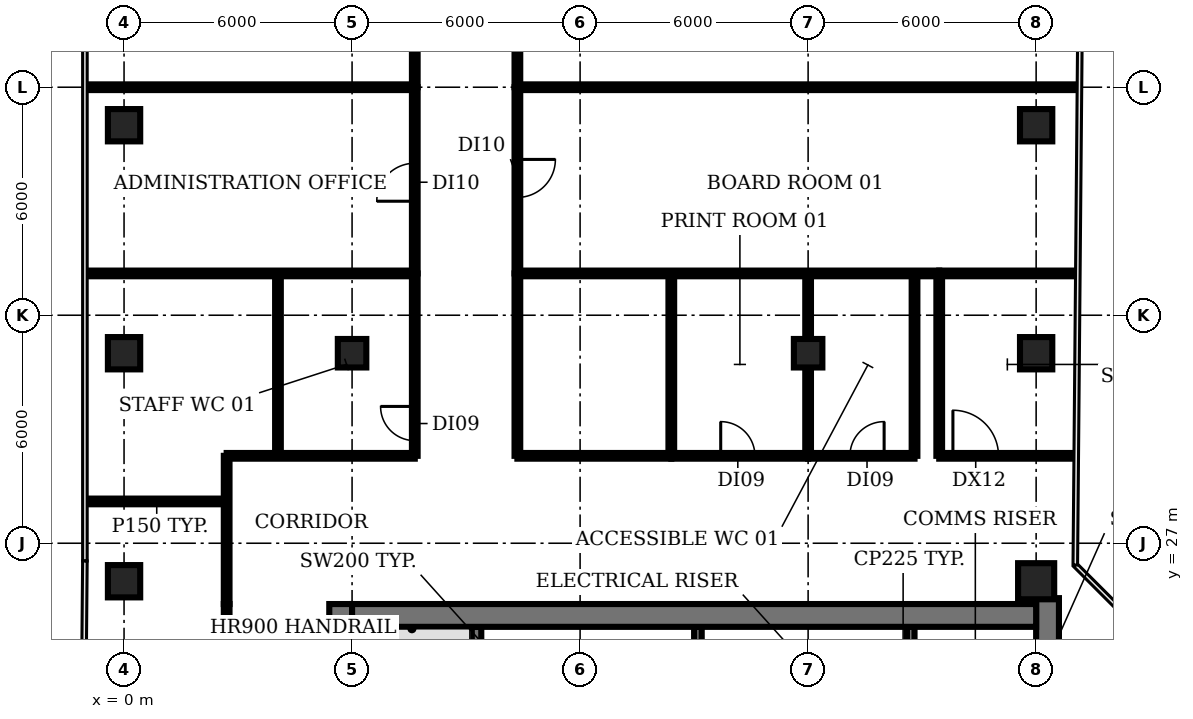
"""IFC4 building model, lengths in metres.
Left out: names, types, materials, properties, quantities, classifications, styles, units other than length and angle.
Written with IfcOpenShell. Run it as: python <this file> out.ifc"""

import sys

from ifc_helpers import new_model, si_unit, direction, frame, frame_2d, origin, origin_2d, place, context, subcontext, project, spatial, rectangle, circle, extrude, element, fill, save


model = new_model("IFC4")
c1 = context("Model", 3, precision=1e-05, world=origin(), true_north=direction((0.0, 1.0)))
c2 = subcontext(c1, "Body", "Model", "MODEL_VIEW")
j1 = project(units=[si_unit("LENGTHUNIT", "METRE"), si_unit("PLANEANGLEUNIT", "RADIAN")], contexts=[c1])
p1 = place(None, origin())
s1 = spatial("IfcSite", under=j1, at=p1, CompositionType="ELEMENT")
p2 = place(p1, origin())
s2 = spatial("IfcBuilding", under=s1, at=p2, CompositionType="ELEMENT")
p3 = place(p2, frame((0.0, 0.0, 167.6)))
s3 = spatial("IfcBuildingStorey", under=s2, at=p3, CompositionType="ELEMENT", Elevation=167.6)
for number, where, z_axis, x_axis in (
    (1, (0.0, 26.0, 0.0), (0.0, 0.0, 1.0), (1.0, 0.0, 0.0)),
    (2, (0.0, 32.0, 0.0), (0.0, 0.0, 1.0), (1.0, 0.0, 0.0)),
    (3, (0.0, 38.0, 0.0), (0.0, 0.0, 1.0), (1.0, 0.0, 0.0)),
):
    element("IfcColumn", number, at=place(p3, frame(where, z_axis=z_axis, x_axis=x_axis)), inside=s3, PredefinedType="COLUMN", context=c2, shape_type="SweptSolid", body=[
        extrude(rectangle(XDim=0.85, YDim=0.85, at=origin_2d()), origin(), (0.0, 0.0, 1.0), 3.85),
    ])
for number, where, z_axis, x_axis in (
    (4, (6.0, 32.0, 0.0), (0.0, 0.0, 1.0), (1.0, 0.0, 0.0)),
    (5, (18.0, 32.0, 0.0), (0.0, 0.0, 1.0), (1.0, 0.0, 0.0)),
):
    element("IfcColumn", number, at=place(p3, frame(where, z_axis=z_axis, x_axis=x_axis)), inside=s3, PredefinedType="COLUMN", context=c2, shape_type="SweptSolid", body=[
        extrude(rectangle(XDim=0.75, YDim=0.75, at=origin_2d()), origin(), (0.0, 0.0, 1.0), 3.85),
    ])
p4 = place(p3, frame((24.0, 26.0, 0.0), z_axis=(0.0, 0.0, 1.0), x_axis=(1.0, 0.0, 0.0)))
e6 = element("IfcColumn", 6, at=p4, inside=s3, PredefinedType="COLUMN", context=c2, shape_type="SweptSolid", body=[
    extrude(circle(Radius=0.475, at=origin_2d()), origin(), (0.0, 0.0, 1.0), 3.85),
])
for number, where, z_axis, x_axis in (
    (7, (24.0, 32.0, 0.0), (0.0, 0.0, 1.0), (1.0, 0.0, 0.0)),
    (8, (24.0, 38.0, 0.0), (0.0, 0.0, 1.0), (1.0, 0.0, 0.0)),
):
    element("IfcColumn", number, at=place(p3, frame(where, z_axis=z_axis, x_axis=x_axis)), inside=s3, PredefinedType="COLUMN", context=c2, shape_type="SweptSolid", body=[
        extrude(rectangle(XDim=0.85, YDim=0.85, at=origin_2d()), origin(), (0.0, 0.0, 1.0), 3.85),
    ])
p5 = place(p3, frame((9.275, 18.375, 0.0), z_axis=(0.0, 0.0, 1.0), x_axis=(0.0, 1.0, 0.0)))
e9 = element("IfcWall", 9, at=p5, inside=s3, PredefinedType="SHEAR", context=c2, shape_type="SweptSolid", body=[
    extrude(rectangle(XDim=6.425, YDim=0.25, at=frame_2d((3.212, 0.0))), origin(), (0.0, 0.0, 1.0), 3.85),
])
for number, where, z_axis, x_axis in (
    (10, (15.1, 22.9, 0.0), (0.0, 0.0, 1.0), (0.0, 1.0, 0.0)),
    (11, (20.7, 22.9, 0.0), (0.0, 0.0, 1.0), (0.0, 1.0, 0.0)),
):
    element("IfcWall", number, at=place(p3, frame(where, z_axis=z_axis, x_axis=x_axis)), inside=s3, PredefinedType="SHEAR", context=c2, shape_type="SweptSolid", body=[
        extrude(rectangle(XDim=1.9, YDim=0.2, at=frame_2d((0.95, 0.0))), origin(), (0.0, 0.0, 1.0), 3.85),
    ])
p6 = place(p3, frame((5.7, 4.8, 0.0), z_axis=(0.0, 0.0, 1.0), x_axis=(0.0, 1.0, 0.0)))
e12 = element("IfcWall", 12, at=p6, inside=s3, PredefinedType="SHEAR", context=c2, shape_type="SweptSolid", body=[
    extrude(rectangle(XDim=20.6, YDim=0.6, at=frame_2d((10.3, 0.0))), origin(), (0.0, 0.0, 1.0), 3.85),
])
p7 = place(p6, frame((0.85, 0.0, 0.0)))
e13 = element("IfcOpeningElement", 13, at=p7, cuts=e12, PredefinedType="OPENING", context=c2, shape_type="SweptSolid", body=[
    extrude(rectangle(XDim=1.5, YDim=2.1, at=frame_2d((0.75, 1.05))), frame((0.0, 0.31, 0.0), z_axis=(0.0, -1.0, 0.0), x_axis=(1.0, 0.0, 0.0)), (0.0, 0.0, 1.0), 0.62),
])
p8 = place(p6, frame((7.3, 0.0, 0.0)))
e14 = element("IfcOpeningElement", 14, at=p8, cuts=e12, PredefinedType="OPENING", context=c2, shape_type="SweptSolid", body=[
    extrude(rectangle(XDim=1.2, YDim=2.1, at=frame_2d((0.6, 1.05))), frame((0.0, 0.31, 0.0), z_axis=(0.0, -1.0, 0.0), x_axis=(1.0, 0.0, 0.0)), (0.0, 0.0, 1.0), 0.62),
])
p9 = place(p6, frame((13.85, 0.0, 0.0)))
e15 = element("IfcOpeningElement", 15, at=p9, cuts=e12, PredefinedType="OPENING", context=c2, shape_type="SweptSolid", body=[
    extrude(rectangle(XDim=1.2, YDim=2.1, at=frame_2d((0.6, 1.05))), frame((0.0, 0.31, 0.0), z_axis=(0.0, -1.0, 0.0), x_axis=(1.0, 0.0, 0.0)), (0.0, 0.0, 1.0), 0.62),
])
p10 = place(p3, frame((24.3, 25.555, 0.0), z_axis=(0.0, 0.0, 1.0), x_axis=(0.0, -1.0, 0.0)))
e16 = element("IfcWall", 16, at=p10, inside=s3, PredefinedType="SHEAR", context=c2, shape_type="SweptSolid", body=[
    extrude(rectangle(XDim=20.755, YDim=0.6, at=frame_2d((10.377, 0.0))), origin(), (0.0, 0.0, 1.0), 3.85),
])
p11 = place(p10, frame((18.405, 0.0, 0.0)))
e17 = element("IfcOpeningElement", 17, at=p11, cuts=e16, PredefinedType="OPENING", context=c2, shape_type="SweptSolid", body=[
    extrude(rectangle(XDim=1.5, YDim=2.1, at=frame_2d((0.75, 1.05))), frame((0.0, 0.31, 0.0), z_axis=(0.0, -1.0, 0.0), x_axis=(1.0, 0.0, 0.0)), (0.0, 0.0, 1.0), 0.62),
])
p12 = place(p10, frame((12.305, 0.0, 0.0)))
e18 = element("IfcOpeningElement", 18, at=p12, cuts=e16, PredefinedType="OPENING", context=c2, shape_type="SweptSolid", body=[
    extrude(rectangle(XDim=0.9, YDim=2.1, at=frame_2d((0.45, 1.05))), frame((0.0, 0.31, 0.0), z_axis=(0.0, -1.0, 0.0), x_axis=(1.0, 0.0, 0.0)), (0.0, 0.0, 1.0), 0.62),
])
p13 = place(p10, frame((6.305, 0.0, 0.0)))
e19 = element("IfcOpeningElement", 19, at=p13, cuts=e16, PredefinedType="OPENING", context=c2, shape_type="SweptSolid", body=[
    extrude(rectangle(XDim=2.0, YDim=2.1, at=frame_2d((1.0, 1.05))), frame((0.0, 0.31, 0.0), z_axis=(0.0, -1.0, 0.0), x_axis=(1.0, 0.0, 0.0)), (0.0, 0.0, 1.0), 0.62),
])
p14 = place(p3, frame((6.0, 25.1, 0.0), z_axis=(0.0, 0.0, 1.0), x_axis=(1.0, 0.0, 0.0)))
e20 = element("IfcWall", 20, at=p14, inside=s3, PredefinedType="SHEAR", context=c2, shape_type="SweptSolid", body=[
    extrude(rectangle(XDim=18.0, YDim=0.6, at=frame_2d((9.0, 0.0))), origin(), (0.0, 0.0, 1.0), 3.85),
])
p15 = place(p3, frame((-0.98, 28.1, 0.0), z_axis=(0.0, 0.0, 1.0), x_axis=(1.0, 0.0, 0.0)))
e21 = element("IfcWall", 21, at=p15, inside=s3, PredefinedType="PARTITIONING", context=c2, shape_type="SweptSolid", body=[
    extrude(rectangle(XDim=3.68, YDim=0.15, at=frame_2d((1.84, 0.0))), origin(), (0.0, 0.0, 1.0), 2.88),
])
for number, where, z_axis, x_axis in (
    (22, (-0.98, 34.1, 0.0), (0.0, 0.0, 1.0), (1.0, 0.0, 0.0)),
    (23, (-0.98, 39.0, 0.0), (0.0, 0.0, 1.0), (1.0, 0.0, 0.0)),
):
    element("IfcWall", number, at=place(p3, frame(where, z_axis=z_axis, x_axis=x_axis)), inside=s3, PredefinedType="PARTITIONING", context=c2, shape_type="SweptSolid", body=[
        extrude(rectangle(XDim=8.63, YDim=0.15, at=frame_2d((4.315, 0.0))), origin(), (0.0, 0.0, 1.0), 2.88),
    ])
p16 = place(p3, frame((2.7, 4.8, 0.0), z_axis=(0.0, 0.0, 1.0), x_axis=(0.0, 1.0, 0.0)))
e24 = element("IfcWall", 24, at=p16, inside=s3, PredefinedType="PARTITIONING", context=c2, shape_type="SweptSolid", body=[
    extrude(rectangle(XDim=20.6, YDim=0.15, at=frame_2d((10.3, 0.0))), origin(), (0.0, 0.0, 1.0), 2.88),
])
p17 = place(p16, frame((10.2, 0.0, 0.0)))
e25 = element("IfcOpeningElement", 25, at=p17, cuts=e24, PredefinedType="OPENING", context=c2, shape_type="SweptSolid", body=[
    extrude(rectangle(XDim=1.2, YDim=2.1, at=frame_2d((0.6, 1.05))), frame((0.0, 0.085, 0.0), z_axis=(0.0, -1.0, 0.0), x_axis=(1.0, 0.0, 0.0)), (0.0, 0.0, 1.0), 0.17),
])
p18 = place(p3, frame((2.7, 25.4, 0.0), z_axis=(0.0, 0.0, 1.0), x_axis=(0.0, 1.0, 0.0)))
e26 = element("IfcWall", 26, at=p18, inside=s3, PredefinedType="PARTITIONING", context=c2, shape_type="SweptSolid", body=[
    extrude(rectangle(XDim=3.9, YDim=0.15, at=frame_2d((1.95, 0.0))), origin(), (0.0, 0.0, 1.0), 2.88),
])
p19 = place(p3, frame((2.7, 29.3, 0.0), z_axis=(0.0, 0.0, 1.0), x_axis=(1.0, 0.0, 0.0)))
e27 = element("IfcWall", 27, at=p19, inside=s3, PredefinedType="PARTITIONING", context=c2, shape_type="SweptSolid", body=[
    extrude(rectangle(XDim=4.95, YDim=0.15, at=frame_2d((2.475, 0.0))), origin(), (0.0, 0.0, 1.0), 2.88),
])
p20 = place(p3, frame((4.05, 29.3, 0.0), z_axis=(0.0, 0.0, 1.0), x_axis=(0.0, 1.0, 0.0)))
e28 = element("IfcWall", 28, at=p20, inside=s3, PredefinedType="PARTITIONING", context=c2, shape_type="SweptSolid", body=[
    extrude(rectangle(XDim=4.8, YDim=0.15, at=frame_2d((2.4, 0.0))), origin(), (0.0, 0.0, 1.0), 2.88),
])
p21 = place(p3, frame((7.65, 29.3, 0.0), z_axis=(0.0, 0.0, 1.0), x_axis=(0.0, 1.0, 0.0)))
e29 = element("IfcWall", 29, at=p21, inside=s3, PredefinedType="PARTITIONING", context=c2, shape_type="SweptSolid", body=[
    extrude(rectangle(XDim=4.8, YDim=0.15, at=frame_2d((2.4, 0.0))), origin(), (0.0, 0.0, 1.0), 2.88),
])
p22 = place(p21, frame((0.4, 0.0, 0.0)))
e30 = element("IfcOpeningElement", 30, at=p22, cuts=e29, PredefinedType="OPENING", context=c2, shape_type="SweptSolid", body=[
    extrude(rectangle(XDim=0.9, YDim=2.1, at=frame_2d((0.45, 1.05))), frame((0.0, 0.085, 0.0), z_axis=(0.0, -1.0, 0.0), x_axis=(1.0, 0.0, 0.0)), (0.0, 0.0, 1.0), 0.17),
])
p23 = place(p3, frame((7.65, 34.1, 0.0), z_axis=(0.0, 0.0, 1.0), x_axis=(0.0, 1.0, 0.0)))
e31 = element("IfcWall", 31, at=p23, inside=s3, PredefinedType="PARTITIONING", context=c2, shape_type="SweptSolid", body=[
    extrude(rectangle(XDim=4.9, YDim=0.15, at=frame_2d((2.45, 0.0))), origin(), (0.0, 0.0, 1.0), 2.88),
])
p24 = place(p23, frame((1.9, 0.0, 0.0)))
e32 = element("IfcOpeningElement", 32, at=p24, cuts=e31, PredefinedType="OPENING", context=c2, shape_type="SweptSolid", body=[
    extrude(rectangle(XDim=1.0, YDim=2.1, at=frame_2d((0.5, 1.05))), frame((0.0, 0.085, 0.0), z_axis=(0.0, -1.0, 0.0), x_axis=(1.0, 0.0, 0.0)), (0.0, 0.0, 1.0), 0.17),
])
p25 = place(p3, frame((7.65, 39.0, 0.0), z_axis=(0.0, 0.0, 1.0), x_axis=(0.0, 1.0, 0.0)))
e33 = element("IfcWall", 33, at=p25, inside=s3, PredefinedType="PARTITIONING", context=c2, shape_type="SweptSolid", body=[
    extrude(rectangle(XDim=6.0, YDim=0.15, at=frame_2d((3.0, 0.0))), origin(), (0.0, 0.0, 1.0), 2.88),
])
p26 = place(p25, frame((1.8, 0.0, 0.0)))
e34 = element("IfcOpeningElement", 34, at=p26, cuts=e33, PredefinedType="OPENING", context=c2, shape_type="SweptSolid", body=[
    extrude(rectangle(XDim=1.0, YDim=2.1, at=frame_2d((0.5, 1.05))), frame((0.0, 0.085, 0.0), z_axis=(0.0, -1.0, 0.0), x_axis=(1.0, 0.0, 0.0)), (0.0, 0.0, 1.0), 0.17),
])
p27 = place(p3, frame((10.35, 29.3, 0.0), z_axis=(0.0, 0.0, 1.0), x_axis=(0.0, 1.0, 0.0)))
e35 = element("IfcWall", 35, at=p27, inside=s3, PredefinedType="PARTITIONING", context=c2, shape_type="SweptSolid", body=[
    extrude(rectangle(XDim=4.8, YDim=0.15, at=frame_2d((2.4, 0.0))), origin(), (0.0, 0.0, 1.0), 2.88),
])
p28 = place(p3, frame((10.35, 29.3, 0.0), z_axis=(0.0, 0.0, 1.0), x_axis=(1.0, 0.0, 0.0)))
e36 = element("IfcWall", 36, at=p28, inside=s3, PredefinedType="PARTITIONING", context=c2, shape_type="SweptSolid", body=[
    extrude(rectangle(XDim=4.05, YDim=0.15, at=frame_2d((2.025, 0.0))), origin(), (0.0, 0.0, 1.0), 2.88),
])
p29 = place(p3, frame((10.35, 34.1, 0.0), z_axis=(0.0, 0.0, 1.0), x_axis=(1.0, 0.0, 0.0)))
e37 = element("IfcWall", 37, at=p29, inside=s3, PredefinedType="PARTITIONING", context=c2, shape_type="SweptSolid", body=[
    extrude(rectangle(XDim=11.1, YDim=0.15, at=frame_2d((5.55, 0.0))), origin(), (0.0, 0.0, 1.0), 2.88),
])
p30 = place(p3, frame((10.35, 39.0, 0.0), z_axis=(0.0, 0.0, 1.0), x_axis=(0.0, -1.0, 0.0)))
e38 = element("IfcWall", 38, at=p30, inside=s3, PredefinedType="PARTITIONING", context=c2, shape_type="SweptSolid", body=[
    extrude(rectangle(XDim=4.9, YDim=0.15, at=frame_2d((2.45, 0.0))), origin(), (0.0, 0.0, 1.0), 2.88),
])
p31 = place(p30, frame((1.9, 0.0, 0.0)))
e39 = element("IfcOpeningElement", 39, at=p31, cuts=e38, PredefinedType="OPENING", context=c2, shape_type="SweptSolid", body=[
    extrude(rectangle(XDim=1.0, YDim=2.1, at=frame_2d((0.5, 1.05))), frame((0.0, 0.085, 0.0), z_axis=(0.0, -1.0, 0.0), x_axis=(1.0, 0.0, 0.0)), (0.0, 0.0, 1.0), 0.17),
])
p32 = place(p3, frame((10.35, 39.0, 0.0), z_axis=(0.0, 0.0, 1.0), x_axis=(1.0, 0.0, 0.0)))
e40 = element("IfcWall", 40, at=p32, inside=s3, PredefinedType="PARTITIONING", context=c2, shape_type="SweptSolid", body=[
    extrude(rectangle(XDim=14.74, YDim=0.15, at=frame_2d((7.37, 0.0))), origin(), (0.0, 0.0, 1.0), 2.88),
])
p33 = place(p3, frame((10.35, 45.0, 0.0), z_axis=(0.0, 0.0, 1.0), x_axis=(0.0, -1.0, 0.0)))
e41 = element("IfcWall", 41, at=p33, inside=s3, PredefinedType="PARTITIONING", context=c2, shape_type="SweptSolid", body=[
    extrude(rectangle(XDim=6.0, YDim=0.15, at=frame_2d((3.0, 0.0))), origin(), (0.0, 0.0, 1.0), 2.88),
])
p34 = place(p33, frame((2.4, 0.0, 0.0)))
e42 = element("IfcOpeningElement", 42, at=p34, cuts=e41, PredefinedType="OPENING", context=c2, shape_type="SweptSolid", body=[
    extrude(rectangle(XDim=1.0, YDim=2.1, at=frame_2d((0.5, 1.05))), frame((0.0, 0.085, 0.0), z_axis=(0.0, -1.0, 0.0), x_axis=(1.0, 0.0, 0.0)), (0.0, 0.0, 1.0), 0.17),
])
p35 = place(p3, frame((14.4, 29.3, 0.0), z_axis=(0.0, 0.0, 1.0), x_axis=(0.0, 1.0, 0.0)))
e43 = element("IfcWall", 43, at=p35, inside=s3, PredefinedType="PARTITIONING", context=c2, shape_type="SweptSolid", body=[
    extrude(rectangle(XDim=4.8, YDim=0.15, at=frame_2d((2.4, 0.0))), origin(), (0.0, 0.0, 1.0), 2.88),
])
p36 = place(p3, frame((14.4, 29.3, 0.0), z_axis=(0.0, 0.0, 1.0), x_axis=(1.0, 0.0, 0.0)))
e44 = element("IfcWall", 44, at=p36, inside=s3, PredefinedType="PARTITIONING", context=c2, shape_type="SweptSolid", body=[
    extrude(rectangle(XDim=3.6, YDim=0.15, at=frame_2d((1.8, 0.0))), origin(), (0.0, 0.0, 1.0), 2.88),
])
p37 = place(p36, frame((1.3, 0.0, 0.0)))
e45 = element("IfcOpeningElement", 45, at=p37, cuts=e44, PredefinedType="OPENING", context=c2, shape_type="SweptSolid", body=[
    extrude(rectangle(XDim=0.9, YDim=2.1, at=frame_2d((0.45, 1.05))), frame((0.0, 0.085, 0.0), z_axis=(0.0, -1.0, 0.0), x_axis=(1.0, 0.0, 0.0)), (0.0, 0.0, 1.0), 0.17),
])
p38 = place(p3, frame((18.0, 29.3, 0.0), z_axis=(0.0, 0.0, 1.0), x_axis=(0.0, 1.0, 0.0)))
e46 = element("IfcWall", 46, at=p38, inside=s3, PredefinedType="PARTITIONING", context=c2, shape_type="SweptSolid", body=[
    extrude(rectangle(XDim=4.8, YDim=0.15, at=frame_2d((2.4, 0.0))), origin(), (0.0, 0.0, 1.0), 2.88),
])
p39 = place(p3, frame((18.0, 29.3, 0.0), z_axis=(0.0, 0.0, 1.0), x_axis=(1.0, 0.0, 0.0)))
e47 = element("IfcWall", 47, at=p39, inside=s3, PredefinedType="PARTITIONING", context=c2, shape_type="SweptSolid", body=[
    extrude(rectangle(XDim=2.8, YDim=0.15, at=frame_2d((1.4, 0.0))), origin(), (0.0, 0.0, 1.0), 2.88),
])
p40 = place(p39, frame((1.1, 0.0, 0.0)))
e48 = element("IfcOpeningElement", 48, at=p40, cuts=e47, PredefinedType="OPENING", context=c2, shape_type="SweptSolid", body=[
    extrude(rectangle(XDim=0.9, YDim=2.1, at=frame_2d((0.45, 1.05))), frame((0.0, 0.085, 0.0), z_axis=(0.0, -1.0, 0.0), x_axis=(1.0, 0.0, 0.0)), (0.0, 0.0, 1.0), 0.17),
])
for number, where, z_axis, x_axis in (
    (49, (20.8, 29.3, 0.0), (0.0, 0.0, 1.0), (0.0, 1.0, 0.0)),
    (50, (21.45, 29.3, 0.0), (0.0, 0.0, 1.0), (0.0, 1.0, 0.0)),
):
    element("IfcWall", number, at=place(p3, frame(where, z_axis=z_axis, x_axis=x_axis)), inside=s3, PredefinedType="PARTITIONING", context=c2, shape_type="SweptSolid", body=[
        extrude(rectangle(XDim=4.8, YDim=0.15, at=frame_2d((2.4, 0.0))), origin(), (0.0, 0.0, 1.0), 2.88),
    ])
p41 = place(p3, frame((21.45, 29.3, 0.0), z_axis=(0.0, 0.0, 1.0), x_axis=(1.0, 0.0, 0.0)))
e51 = element("IfcWall", 51, at=p41, inside=s3, PredefinedType="PARTITIONING", context=c2, shape_type="SweptSolid", body=[
    extrude(rectangle(XDim=3.56, YDim=0.15, at=frame_2d((1.78, 0.0))), origin(), (0.0, 0.0, 1.0), 2.88),
])
p42 = place(p41, frame((0.36, 0.0, 0.0)))
e52 = element("IfcOpeningElement", 52, at=p42, cuts=e51, PredefinedType="OPENING", context=c2, shape_type="SweptSolid", body=[
    extrude(rectangle(XDim=1.2, YDim=2.1, at=frame_2d((0.6, 1.05))), frame((0.0, 0.085, 0.0), z_axis=(0.0, -1.0, 0.0), x_axis=(1.0, 0.0, 0.0)), (0.0, 0.0, 1.0), 0.17),
])
p43 = place(p3, frame((21.45, 34.1, 0.0), z_axis=(0.0, 0.0, 1.0), x_axis=(1.0, 0.0, 0.0)))
e53 = element("IfcWall", 53, at=p43, inside=s3, PredefinedType="PARTITIONING", context=c2, shape_type="SweptSolid", body=[
    extrude(rectangle(XDim=3.6, YDim=0.15, at=frame_2d((1.8, 0.0))), origin(), (0.0, 0.0, 1.0), 2.88),
])
p44 = place(p22, origin())
e54 = element("IfcDoor", 54, at=p44, inside=s3, OperationType="SINGLE_SWING_RIGHT", PredefinedType="DOOR", context=c2, shape_type="SweptSolid", body=[
    extrude(rectangle(XDim=0.9, YDim=2.1, at=frame_2d((0.45, 1.05))), frame((0.0, 0.025, 0.0), z_axis=(0.0, -1.0, 0.0), x_axis=(1.0, 0.0, 0.0)), (0.0, 0.0, 1.0), 0.05),
])
fill(e30, e54)
p45 = place(p24, origin())
e55 = element("IfcDoor", 55, at=p45, inside=s3, OperationType="SINGLE_SWING_LEFT", PredefinedType="DOOR", context=c2, shape_type="SweptSolid", body=[
    extrude(rectangle(XDim=1.0, YDim=2.1, at=frame_2d((0.5, 1.05))), frame((0.0, 0.025, 0.0), z_axis=(0.0, -1.0, 0.0), x_axis=(1.0, 0.0, 0.0)), (0.0, 0.0, 1.0), 0.05),
])
fill(e32, e55)
p46 = place(p31, origin())
e56 = element("IfcDoor", 56, at=p46, inside=s3, OperationType="SINGLE_SWING_LEFT", PredefinedType="DOOR", context=c2, shape_type="SweptSolid", body=[
    extrude(rectangle(XDim=1.0, YDim=2.1, at=frame_2d((0.5, 1.05))), frame((0.0, 0.025, 0.0), z_axis=(0.0, -1.0, 0.0), x_axis=(1.0, 0.0, 0.0)), (0.0, 0.0, 1.0), 0.05),
])
fill(e39, e56)
p47 = place(p37, origin())
e57 = element("IfcDoor", 57, at=p47, inside=s3, OperationType="SINGLE_SWING_LEFT", PredefinedType="DOOR", context=c2, shape_type="SweptSolid", body=[
    extrude(rectangle(XDim=0.9, YDim=2.1, at=frame_2d((0.45, 1.05))), frame((0.0, 0.025, 0.0), z_axis=(0.0, -1.0, 0.0), x_axis=(1.0, 0.0, 0.0)), (0.0, 0.0, 1.0), 0.05),
])
fill(e45, e57)
p48 = place(p40, origin())
e58 = element("IfcDoor", 58, at=p48, inside=s3, OperationType="SINGLE_SWING_RIGHT", PredefinedType="DOOR", context=c2, shape_type="SweptSolid", body=[
    extrude(rectangle(XDim=0.9, YDim=2.1, at=frame_2d((0.45, 1.05))), frame((0.0, 0.025, 0.0), z_axis=(0.0, -1.0, 0.0), x_axis=(1.0, 0.0, 0.0)), (0.0, 0.0, 1.0), 0.05),
])
fill(e48, e58)
p49 = place(p42, origin())
e59 = element("IfcDoor", 59, at=p49, inside=s3, OperationType="SINGLE_SWING_LEFT", PredefinedType="DOOR", context=c2, shape_type="SweptSolid", body=[
    extrude(rectangle(XDim=1.2, YDim=2.1, at=frame_2d((0.6, 1.05))), frame((0.0, 0.025, 0.0), z_axis=(0.0, -1.0, 0.0), x_axis=(1.0, 0.0, 0.0)), (0.0, 0.0, 1.0), 0.05),
])
fill(e52, e59)
save(model, sys.argv[1])
